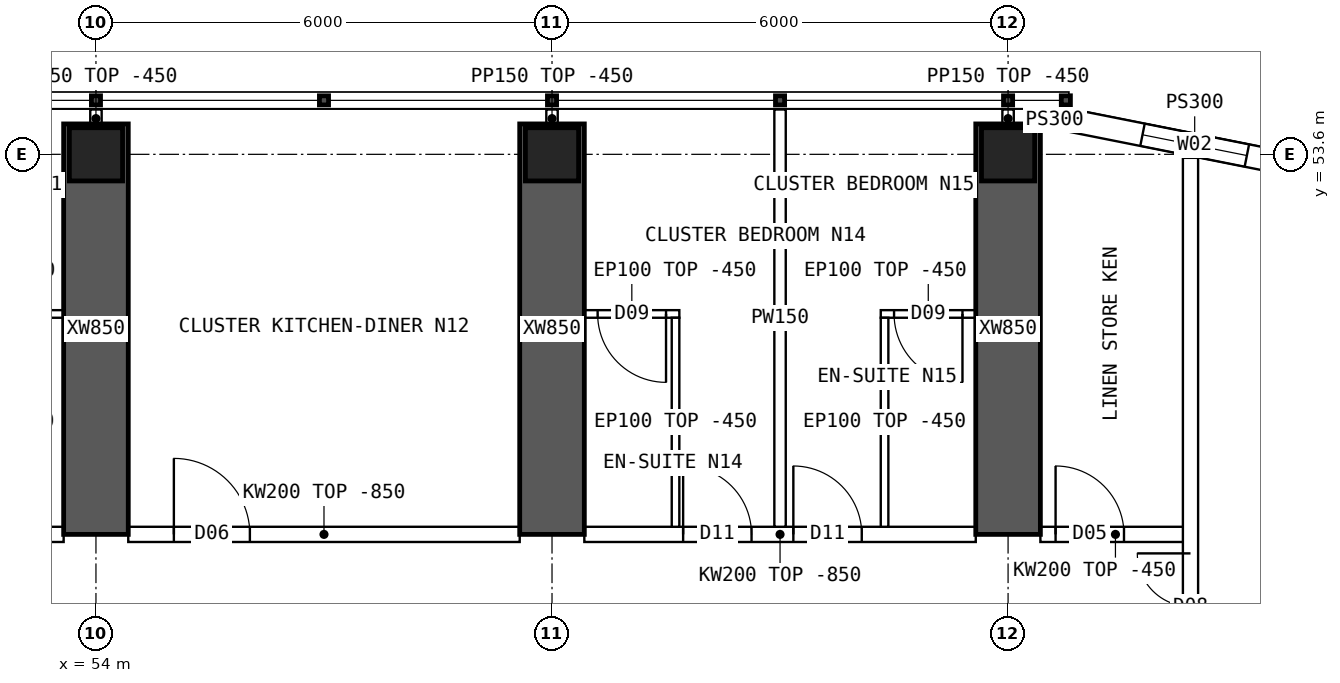
"""IFC4 building model, lengths in metres.
Left out: names, types, materials, properties, quantities, classifications, styles, units other than length and angle.
Written with IfcOpenShell. Run it as: python <this file> out.ifc"""

import sys

from ifc_helpers import new_model, si_unit, direction, frame, frame_2d, origin, origin_2d, place, context, subcontext, project, spatial, polyline, rectangle, hollow_rectangle, outline, extrude, element, fill, save


model = new_model("IFC4")
c1 = context("Model", 3, precision=1e-05, world=origin(), true_north=direction((0.0, 1.0)))
c2 = subcontext(c1, "Body", "Model", "MODEL_VIEW")
j1 = project(units=[si_unit("LENGTHUNIT", "METRE"), si_unit("PLANEANGLEUNIT", "RADIAN")], contexts=[c1])
p1 = place(None, origin())
s1 = spatial("IfcSite", under=j1, at=p1, CompositionType="ELEMENT")
p2 = place(p1, origin())
s2 = spatial("IfcBuilding", under=s1, at=p2, CompositionType="ELEMENT")
p3 = place(p2, frame((0.0, 0.0, 174.85)))
s3 = spatial("IfcBuildingStorey", under=s2, at=p3, CompositionType="ELEMENT", Elevation=174.85)
for number, where, z_axis, x_axis in (
    (1, (54.0, 53.6, 0.0), (0.0, 0.0, 1.0), (1.0, 0.0, 0.0)),
    (2, (60.0, 53.6, 0.0), (0.0, 0.0, 1.0), (1.0, 0.0, 0.0)),
    (3, (66.0, 53.6, 0.0), (0.0, 0.0, 1.0), (1.0, 0.0, 0.0)),
):
    element("IfcColumn", number, at=place(p3, frame(where, z_axis=z_axis, x_axis=x_axis)), inside=s3, PredefinedType="COLUMN", context=c2, shape_type="SweptSolid", body=[
        extrude(hollow_rectangle(XDim=0.7, YDim=0.7, WallThickness=0.07, at=origin_2d()), origin(), (0.0, 0.0, 1.0), 3.75),
    ])
for number, where, z_axis, x_axis in (
    (4, (54.0, 48.6, 0.0), (0.0, 0.0, 1.0), (0.0, 1.0, 0.0)),
    (5, (60.0, 48.6, 0.0), (0.0, 0.0, 1.0), (0.0, 1.0, 0.0)),
    (6, (66.0, 48.6, 0.0), (0.0, 0.0, 1.0), (0.0, 1.0, 0.0)),
):
    element("IfcWall", number, at=place(p3, frame(where, z_axis=z_axis, x_axis=x_axis)), inside=s3, PredefinedType="SHEAR", context=c2, shape_type="SweptSolid", body=[
        extrude(rectangle(XDim=5.4, YDim=0.85, at=frame_2d((2.7, 0.0))), origin(), (0.0, 0.0, 1.0), 3.75),
    ])
p4 = place(p3, frame((70.11, 53.392, 0.0), z_axis=(0.0, 0.0, 1.0), x_axis=(-0.98078325777, 0.195100490205, 0.0)))
e7 = element("IfcWall", 7, at=p4, inside=s3, PredefinedType="SOLIDWALL", context=c2, shape_type="SweptSolid", body=[
    extrude(outline(polyline([(-0.03, -0.15), (3.405, -0.15), (3.345, 0.15), (0.03, 0.15), (-0.03, -0.15)])), origin(), (0.0, 0.0, 1.0), 3.3),
])
p5 = place(p4, frame((0.988, 0.0, 0.9)))
e8 = element("IfcOpeningElement", 8, at=p5, cuts=e7, PredefinedType="OPENING", context=c2, shape_type="SweptSolid", body=[
    extrude(rectangle(XDim=1.4, YDim=1.8, at=frame_2d((0.7, 0.9))), frame((0.0, 0.16, 0.0), z_axis=(0.0, -1.0, 0.0), x_axis=(1.0, 0.0, 0.0)), (0.0, 0.0, 1.0), 0.32),
])
p6 = place(p3, frame((66.8, 54.05, 0.0), z_axis=(0.0, 0.0, 1.0), x_axis=(-1.0, 0.0, 0.0)))
e9 = element("IfcWall", 9, at=p6, inside=s3, PredefinedType="SOLIDWALL", context=c2, shape_type="SweptSolid", body=[
    extrude(rectangle(XDim=0.375, YDim=0.3, at=frame_2d((0.188, 0.0))), origin(), (0.0, 0.0, 1.0), 3.3),
])
p7 = place(p3, frame((48.425, 48.6, 0.0), z_axis=(0.0, 0.0, 1.0), x_axis=(1.0, 0.0, 0.0)))
e10 = element("IfcWall", 10, at=p7, inside=s3, PredefinedType="SOLIDWALL", context=c2, shape_type="SweptSolid", body=[
    extrude(outline(polyline([(0.0, 0.0), (5.15, 0.0), (5.15, 2.9), (0.0, 2.9), (0.0, 0.0)])), frame((0.0, 0.1, 0.0), z_axis=(0.0, -1.0, 0.0), x_axis=(1.0, 0.0, 0.0)), (0.0, 0.0, 1.0), 0.2),
])
p8 = place(p7, frame((1.3, 0.0, 0.0)))
e11 = element("IfcOpeningElement", 11, at=p8, cuts=e10, PredefinedType="OPENING", context=c2, shape_type="SweptSolid", body=[
    extrude(rectangle(XDim=0.9, YDim=2.1, at=frame_2d((0.45, 1.05))), frame((0.0, 0.11, 0.0), z_axis=(0.0, -1.0, 0.0), x_axis=(1.0, 0.0, 0.0)), (0.0, 0.0, 1.0), 0.22),
])
p9 = place(p7, frame((2.75, 0.0, 0.0)))
e12 = element("IfcOpeningElement", 12, at=p9, cuts=e10, PredefinedType="OPENING", context=c2, shape_type="SweptSolid", body=[
    extrude(rectangle(XDim=0.9, YDim=2.1, at=frame_2d((0.45, 1.05))), frame((0.0, 0.11, 0.0), z_axis=(0.0, -1.0, 0.0), x_axis=(1.0, 0.0, 0.0)), (0.0, 0.0, 1.0), 0.22),
])
p10 = place(p3, frame((54.425, 48.6, 0.0), z_axis=(0.0, 0.0, 1.0), x_axis=(1.0, 0.0, 0.0)))
e13 = element("IfcWall", 13, at=p10, inside=s3, PredefinedType="SOLIDWALL", context=c2, shape_type="SweptSolid", body=[
    extrude(outline(polyline([(0.0, 0.0), (5.15, 0.0), (5.15, 2.9), (0.0, 2.9), (0.0, 0.0)])), frame((0.0, 0.1, 0.0), z_axis=(0.0, -1.0, 0.0), x_axis=(1.0, 0.0, 0.0)), (0.0, 0.0, 1.0), 0.2),
])
p11 = place(p10, frame((0.6, 0.0, 0.0)))
e14 = element("IfcOpeningElement", 14, at=p11, cuts=e13, PredefinedType="OPENING", context=c2, shape_type="SweptSolid", body=[
    extrude(rectangle(XDim=1.0, YDim=2.1, at=frame_2d((0.5, 1.05))), frame((0.0, 0.11, 0.0), z_axis=(0.0, -1.0, 0.0), x_axis=(1.0, 0.0, 0.0)), (0.0, 0.0, 1.0), 0.22),
])
p12 = place(p3, frame((60.425, 48.6, 0.0), z_axis=(0.0, 0.0, 1.0), x_axis=(1.0, 0.0, 0.0)))
e15 = element("IfcWall", 15, at=p12, inside=s3, PredefinedType="SOLIDWALL", context=c2, shape_type="SweptSolid", body=[
    extrude(outline(polyline([(0.0, 0.0), (5.15, 0.0), (5.15, 2.9), (0.0, 2.9), (0.0, 0.0)])), frame((0.0, 0.1, 0.0), z_axis=(0.0, -1.0, 0.0), x_axis=(1.0, 0.0, 0.0)), (0.0, 0.0, 1.0), 0.2),
])
p13 = place(p12, frame((1.3, 0.0, 0.0)))
e16 = element("IfcOpeningElement", 16, at=p13, cuts=e15, PredefinedType="OPENING", context=c2, shape_type="SweptSolid", body=[
    extrude(rectangle(XDim=0.9, YDim=2.1, at=frame_2d((0.45, 1.05))), frame((0.0, 0.11, 0.0), z_axis=(0.0, -1.0, 0.0), x_axis=(1.0, 0.0, 0.0)), (0.0, 0.0, 1.0), 0.22),
])
p14 = place(p12, frame((2.75, 0.0, 0.0)))
e17 = element("IfcOpeningElement", 17, at=p14, cuts=e15, PredefinedType="OPENING", context=c2, shape_type="SweptSolid", body=[
    extrude(rectangle(XDim=0.9, YDim=2.1, at=frame_2d((0.45, 1.05))), frame((0.0, 0.11, 0.0), z_axis=(0.0, -1.0, 0.0), x_axis=(1.0, 0.0, 0.0)), (0.0, 0.0, 1.0), 0.22),
])
p15 = place(p3, frame((66.425, 48.6, 0.0), z_axis=(0.0, 0.0, 1.0), x_axis=(1.0, 0.0, 0.0)))
e18 = element("IfcWall", 18, at=p15, inside=s3, PredefinedType="SOLIDWALL", context=c2, shape_type="SweptSolid", body=[
    extrude(rectangle(XDim=1.975, YDim=0.2, at=frame_2d((0.987, 0.0))), origin(), (0.0, 0.0, 1.0), 3.3),
])
p16 = place(p15, frame((0.2, 0.0, 0.0)))
e19 = element("IfcOpeningElement", 19, at=p16, cuts=e18, PredefinedType="OPENING", context=c2, shape_type="SweptSolid", body=[
    extrude(rectangle(XDim=0.9, YDim=2.1, at=frame_2d((0.45, 1.05))), frame((0.0, 0.11, 0.0), z_axis=(0.0, -1.0, 0.0), x_axis=(1.0, 0.0, 0.0)), (0.0, 0.0, 1.0), 0.22),
])
p17 = place(p3, frame((52.325, 51.5, 0.0), z_axis=(0.0, 0.0, 1.0), x_axis=(1.0, 0.0, 0.0)))
e20 = element("IfcWall", 20, at=p17, inside=s3, PredefinedType="PARTITIONING", context=c2, shape_type="SweptSolid", body=[
    extrude(rectangle(XDim=1.25, YDim=0.1, at=frame_2d((0.625, 0.0))), origin(), (0.0, 0.0, 1.0), 3.3),
])
p18 = place(p17, frame((0.175, 0.0, 0.0)))
e21 = element("IfcOpeningElement", 21, at=p18, cuts=e20, PredefinedType="OPENING", context=c2, shape_type="SweptSolid", body=[
    extrude(rectangle(XDim=0.9, YDim=2.1, at=frame_2d((0.45, 1.05))), frame((0.0, 0.06, 0.0), z_axis=(0.0, -1.0, 0.0), x_axis=(1.0, 0.0, 0.0)), (0.0, 0.0, 1.0), 0.12),
])
p19 = place(p3, frame((63.0, 54.19, 0.0), z_axis=(0.0, 0.0, 1.0), x_axis=(0.0, -1.0, 0.0)))
e22 = element("IfcWall", 22, at=p19, inside=s3, PredefinedType="PARTITIONING", context=c2, shape_type="SweptSolid", body=[
    extrude(outline(polyline([(0.0, 0.0), (5.49, 0.0), (5.49, 2.9), (5.442, 2.9), (5.44, 3.3), (0.792, 3.3), (0.79, 2.9), (0.392, 2.9), (0.39, 3.3), (0.0, 3.3), (0.0, 0.0)])), frame((0.0, 0.075, 0.0), z_axis=(0.0, -1.0, 0.0), x_axis=(1.0, 0.0, 0.0)), (0.0, 0.0, 1.0), 0.15),
])
p20 = place(p3, frame((60.425, 51.5, 0.0), z_axis=(0.0, 0.0, 1.0), x_axis=(1.0, 0.0, 0.0)))
e23 = element("IfcWall", 23, at=p20, inside=s3, PredefinedType="PARTITIONING", context=c2, shape_type="SweptSolid", body=[
    extrude(rectangle(XDim=1.25, YDim=0.1, at=frame_2d((0.625, 0.0))), origin(), (0.0, 0.0, 1.0), 3.3),
])
p21 = place(p20, frame((0.175, 0.0, 0.0)))
e24 = element("IfcOpeningElement", 24, at=p21, cuts=e23, PredefinedType="OPENING", context=c2, shape_type="SweptSolid", body=[
    extrude(rectangle(XDim=0.9, YDim=2.1, at=frame_2d((0.45, 1.05))), frame((0.0, 0.06, 0.0), z_axis=(0.0, -1.0, 0.0), x_axis=(1.0, 0.0, 0.0)), (0.0, 0.0, 1.0), 0.12),
])
p22 = place(p3, frame((61.625, 51.45, 0.0), z_axis=(0.0, 0.0, 1.0), x_axis=(0.0, -1.0, 0.0)))
e25 = element("IfcWall", 25, at=p22, inside=s3, PredefinedType="PARTITIONING", context=c2, shape_type="SweptSolid", body=[
    extrude(outline(polyline([(0.0, 0.0), (2.75, 0.0), (2.75, 2.9), (2.702, 2.9), (2.7, 3.3), (0.0, 3.3), (0.0, 0.0)])), frame((0.0, 0.05, 0.0), z_axis=(0.0, -1.0, 0.0), x_axis=(1.0, 0.0, 0.0)), (0.0, 0.0, 1.0), 0.1),
])
p23 = place(p3, frame((64.325, 51.5, 0.0), z_axis=(0.0, 0.0, 1.0), x_axis=(1.0, 0.0, 0.0)))
e26 = element("IfcWall", 26, at=p23, inside=s3, PredefinedType="PARTITIONING", context=c2, shape_type="SweptSolid", body=[
    extrude(rectangle(XDim=1.25, YDim=0.1, at=frame_2d((0.625, 0.0))), origin(), (0.0, 0.0, 1.0), 3.3),
])
p24 = place(p23, frame((0.175, 0.0, 0.0)))
e27 = element("IfcOpeningElement", 27, at=p24, cuts=e26, PredefinedType="OPENING", context=c2, shape_type="SweptSolid", body=[
    extrude(rectangle(XDim=0.9, YDim=2.1, at=frame_2d((0.45, 1.05))), frame((0.0, 0.06, 0.0), z_axis=(0.0, -1.0, 0.0), x_axis=(1.0, 0.0, 0.0)), (0.0, 0.0, 1.0), 0.12),
])
p25 = place(p3, frame((64.375, 51.45, 0.0), z_axis=(0.0, 0.0, 1.0), x_axis=(0.0, -1.0, 0.0)))
e28 = element("IfcWall", 28, at=p25, inside=s3, PredefinedType="PARTITIONING", context=c2, shape_type="SweptSolid", body=[
    extrude(outline(polyline([(0.0, 0.0), (2.75, 0.0), (2.75, 2.9), (2.702, 2.9), (2.7, 3.3), (0.0, 3.3), (0.0, 0.0)])), frame((0.0, 0.05, 0.0), z_axis=(0.0, -1.0, 0.0), x_axis=(1.0, 0.0, 0.0)), (0.0, 0.0, 1.0), 0.1),
])
p26 = place(p3, frame((68.4, 10.446, 0.0), z_axis=(0.0, 0.0, 1.0), x_axis=(0.0, 1.0, 0.0)))
e29 = element("IfcWall", 29, at=p26, inside=s3, PredefinedType="SOLIDWALL", context=c2, shape_type="SweptSolid", body=[
    extrude(rectangle(XDim=43.107, YDim=0.2, at=frame_2d((21.554, 0.0))), origin(), (0.0, 0.0, 1.0), 3.3),
])
p27 = place(p26, frame((13.914, 0.0, 0.0)))
e30 = element("IfcOpeningElement", 30, at=p27, cuts=e29, PredefinedType="OPENING", context=c2, shape_type="SweptSolid", body=[
    extrude(rectangle(XDim=1.2, YDim=2.1, at=frame_2d((0.6, 1.05))), frame((0.0, 0.11, 0.0), z_axis=(0.0, -1.0, 0.0), x_axis=(1.0, 0.0, 0.0)), (0.0, 0.0, 1.0), 0.22),
])
p28 = place(p26, frame((22.634, 0.0, 0.0)))
e31 = element("IfcOpeningElement", 31, at=p28, cuts=e29, PredefinedType="OPENING", context=c2, shape_type="SweptSolid", body=[
    extrude(rectangle(XDim=1.2, YDim=2.1, at=frame_2d((0.6, 1.05))), frame((0.0, 0.11, 0.0), z_axis=(0.0, -1.0, 0.0), x_axis=(1.0, 0.0, 0.0)), (0.0, 0.0, 1.0), 0.22),
])
p29 = place(p26, frame((5.104, 0.0, 0.0)))
e32 = element("IfcOpeningElement", 32, at=p29, cuts=e29, PredefinedType="OPENING", context=c2, shape_type="SweptSolid", body=[
    extrude(rectangle(XDim=1.4, YDim=2.1, at=frame_2d((0.7, 1.05))), frame((0.0, 0.11, 0.0), z_axis=(0.0, -1.0, 0.0), x_axis=(1.0, 0.0, 0.0)), (0.0, 0.0, 1.0), 0.22),
])
p30 = place(p26, frame((36.504, 0.0, 0.0)))
e33 = element("IfcOpeningElement", 33, at=p30, cuts=e29, PredefinedType="OPENING", context=c2, shape_type="SweptSolid", body=[
    extrude(rectangle(XDim=1.4, YDim=2.1, at=frame_2d((0.7, 1.05))), frame((0.0, 0.11, 0.0), z_axis=(0.0, -1.0, 0.0), x_axis=(1.0, 0.0, 0.0)), (0.0, 0.0, 1.0), 0.22),
])
for number, where, z_axis, x_axis in (
    (34, (54.0, 53.95, 0.0), (0.0, 0.0, 1.0), (0.0, 1.0, 0.0)),
    (35, (60.0, 53.95, 0.0), (0.0, 0.0, 1.0), (0.0, 1.0, 0.0)),
    (36, (66.0, 53.95, 0.0), (0.0, 0.0, 1.0), (0.0, 1.0, 0.0)),
):
    element("IfcWall", number, at=place(p3, frame(where, z_axis=z_axis, x_axis=x_axis)), inside=s3, PredefinedType="PARTITIONING", context=c2, shape_type="SweptSolid", body=[
        extrude(rectangle(XDim=0.24, YDim=0.15, at=frame_2d((0.12, 0.0))), origin(), (0.0, 0.0, 1.0), 3.3),
    ])
p31 = place(p5, origin())
e37 = element("IfcWindow", 37, at=p31, inside=s3, PartitioningType="SINGLE_PANEL", PredefinedType="WINDOW", context=c2, shape_type="SweptSolid", body=[
    extrude(rectangle(XDim=1.4, YDim=1.8, at=frame_2d((0.7, 0.9))), frame((0.0, 0.03, 0.0), z_axis=(0.0, -1.0, 0.0), x_axis=(1.0, 0.0, 0.0)), (0.0, 0.0, 1.0), 0.06),
])
fill(e8, e37)
p32 = place(p11, origin())
e38 = element("IfcDoor", 38, at=p32, inside=s3, OperationType="SINGLE_SWING_LEFT", PredefinedType="DOOR", context=c2, shape_type="SweptSolid", body=[
    extrude(rectangle(XDim=1.0, YDim=2.1, at=frame_2d((0.5, 1.05))), frame((0.0, 0.025, 0.0), z_axis=(0.0, -1.0, 0.0), x_axis=(1.0, 0.0, 0.0)), (0.0, 0.0, 1.0), 0.05),
])
fill(e14, e38)
p33 = place(p21, origin())
e39 = element("IfcDoor", 39, at=p33, inside=s3, OperationType="SINGLE_SWING_RIGHT", PredefinedType="DOOR", context=c2, shape_type="SweptSolid", body=[
    extrude(rectangle(XDim=0.9, YDim=2.1, at=frame_2d((0.45, 1.05))), frame((0.0, 0.025, 0.0), z_axis=(0.0, -1.0, 0.0), x_axis=(1.0, 0.0, 0.0)), (0.0, 0.0, 1.0), 0.05),
])
fill(e24, e39)
p34 = place(p13, origin())
e40 = element("IfcDoor", 40, at=p34, inside=s3, OperationType="SINGLE_SWING_LEFT", PredefinedType="DOOR", context=c2, shape_type="SweptSolid", body=[
    extrude(rectangle(XDim=0.9, YDim=2.1, at=frame_2d((0.45, 1.05))), frame((0.0, 0.025, 0.0), z_axis=(0.0, -1.0, 0.0), x_axis=(1.0, 0.0, 0.0)), (0.0, 0.0, 1.0), 0.05),
])
fill(e16, e40)
p35 = place(p24, origin())
e41 = element("IfcDoor", 41, at=p35, inside=s3, OperationType="SINGLE_SWING_RIGHT", PredefinedType="DOOR", context=c2, shape_type="SweptSolid", body=[
    extrude(rectangle(XDim=0.9, YDim=2.1, at=frame_2d((0.45, 1.05))), frame((0.0, 0.025, 0.0), z_axis=(0.0, -1.0, 0.0), x_axis=(1.0, 0.0, 0.0)), (0.0, 0.0, 1.0), 0.05),
])
fill(e27, e41)
p36 = place(p14, origin())
e42 = element("IfcDoor", 42, at=p36, inside=s3, OperationType="SINGLE_SWING_LEFT", PredefinedType="DOOR", context=c2, shape_type="SweptSolid", body=[
    extrude(rectangle(XDim=0.9, YDim=2.1, at=frame_2d((0.45, 1.05))), frame((0.0, 0.025, 0.0), z_axis=(0.0, -1.0, 0.0), x_axis=(1.0, 0.0, 0.0)), (0.0, 0.0, 1.0), 0.05),
])
fill(e17, e42)
p37 = place(p30, origin())
e43 = element("IfcDoor", 43, at=p37, inside=s3, OperationType="DOUBLE_DOOR_SINGLE_SWING", PredefinedType="DOOR", context=c2, shape_type="SweptSolid", body=[
    extrude(rectangle(XDim=1.4, YDim=2.1, at=frame_2d((0.7, 1.05))), frame((0.0, 0.025, 0.0), z_axis=(0.0, -1.0, 0.0), x_axis=(1.0, 0.0, 0.0)), (0.0, 0.0, 1.0), 0.05),
])
fill(e33, e43)
p38 = place(p16, origin())
e44 = element("IfcDoor", 44, at=p38, inside=s3, OperationType="SINGLE_SWING_LEFT", PredefinedType="DOOR", context=c2, shape_type="SweptSolid", body=[
    extrude(rectangle(XDim=0.9, YDim=2.1, at=frame_2d((0.45, 1.05))), frame((0.0, 0.025, 0.0), z_axis=(0.0, -1.0, 0.0), x_axis=(1.0, 0.0, 0.0)), (0.0, 0.0, 1.0), 0.05),
])
fill(e19, e44)
save(model, sys.argv[1])
